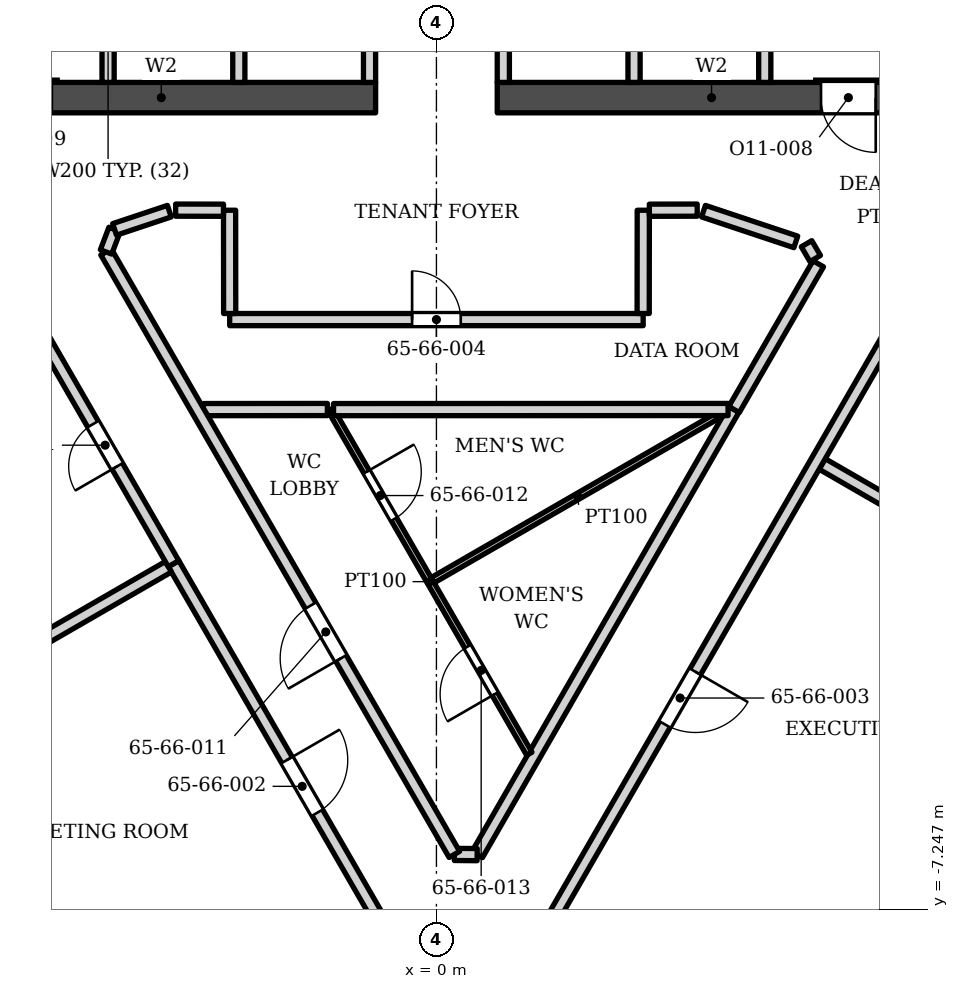
"""IFC4 building model, lengths in metres.
Left out: names, types, materials, properties, quantities, classifications, styles, units other than length and angle.
Written with IfcOpenShell. Run it as: python <this file> out.ifc"""

import sys

from ifc_helpers import new_model, si_unit, direction, frame, frame_2d, origin, place, context, subcontext, project, spatial, rectangle, extrude, element, fill, save


model = new_model("IFC4")
c1 = context("Model", 3, precision=1e-05, world=origin(), true_north=direction((0.0, 1.0)))
c2 = subcontext(c1, "Body", "Model", "MODEL_VIEW")
j1 = project(units=[si_unit("LENGTHUNIT", "METRE"), si_unit("PLANEANGLEUNIT", "RADIAN")], contexts=[c1])
p1 = place(None, origin())
s1 = spatial("IfcSite", under=j1, at=p1, CompositionType="ELEMENT")
p2 = place(p1, origin())
s2 = spatial("IfcBuilding", under=s1, at=p2, CompositionType="ELEMENT")
p3 = place(p2, frame((0.0, 0.0, 271.6)))
s3 = spatial("IfcBuildingStorey", under=s2, at=p3, CompositionType="ELEMENT", Elevation=271.6)
p4 = place(p3, frame((-8.05, 6.103, 0.0), z_axis=(0.0, 0.0, 1.0), x_axis=(1.0, 0.0, 0.0)))
e1 = element("IfcWall", 1, at=p4, inside=s3, PredefinedType="SHEAR", context=c2, shape_type="SweptSolid", body=[
    extrude(rectangle(XDim=7.05, YDim=0.5, at=frame_2d((3.525, 0.0))), origin(), (0.0, 0.0, 1.0), 3.9),
])
p5 = place(p4, frame((0.825, 0.0, 0.0)))
e2 = element("IfcOpeningElement", 2, at=p5, cuts=e1, PredefinedType="OPENING", context=c2, shape_type="SweptSolid", body=[
    extrude(rectangle(XDim=0.9, YDim=2.1, at=frame_2d((0.45, 1.05))), frame((0.0, 0.26, 0.0), z_axis=(0.0, -1.0, 0.0), x_axis=(1.0, 0.0, 0.0)), (0.0, 0.0, 1.0), 0.52),
])
p6 = place(p3, frame((1.0, 6.103, 0.0), z_axis=(0.0, 0.0, 1.0), x_axis=(1.0, 0.0, 0.0)))
e3 = element("IfcWall", 3, at=p6, inside=s3, PredefinedType="SHEAR", context=c2, shape_type="SweptSolid", body=[
    extrude(rectangle(XDim=7.05, YDim=0.5, at=frame_2d((3.525, 0.0))), origin(), (0.0, 0.0, 1.0), 3.9),
])
p7 = place(p6, frame((5.325, 0.0, 0.0)))
e4 = element("IfcOpeningElement", 4, at=p7, cuts=e3, PredefinedType="OPENING", context=c2, shape_type="SweptSolid", body=[
    extrude(rectangle(XDim=0.9, YDim=2.1, at=frame_2d((0.45, 1.05))), frame((0.0, 0.26, 0.0), z_axis=(0.0, -1.0, 0.0), x_axis=(1.0, 0.0, 0.0)), (0.0, 0.0, 1.0), 0.52),
])
for number, where, z_axis, x_axis in (
    (5, (-5.4, 6.353, 0.0), (0.0, 0.0, 1.0), (0.0, 1.0, 0.0)),
    (6, (-3.25, 6.353, 0.0), (0.0, 0.0, 1.0), (0.0, 1.0, 0.0)),
    (7, (-1.1, 6.353, 0.0), (0.0, 0.0, 1.0), (0.0, 1.0, 0.0)),
    (8, (1.1, 6.353, 0.0), (0.0, 0.0, 1.0), (0.0, 1.0, 0.0)),
    (9, (3.25, 6.353, 0.0), (0.0, 0.0, 1.0), (0.0, 1.0, 0.0)),
    (10, (5.4, 6.353, 0.0), (0.0, 0.0, 1.0), (0.0, 1.0, 0.0)),
):
    element("IfcWall", number, at=place(p3, frame(where, z_axis=z_axis, x_axis=x_axis)), inside=s3, PredefinedType="SOLIDWALL", context=c2, shape_type="SweptSolid", body=[
        extrude(rectangle(XDim=2.5, YDim=0.2, at=frame_2d((1.25, 0.0))), origin(), (0.0, 0.0, 1.0), 3.73),
    ])
p8 = place(p3, frame((-4.323, -1.562, 0.0), z_axis=(0.0, 0.0, 1.0), x_axis=(0.500177101832, -0.865923129846, 0.0)))
e11 = element("IfcWall", 11, at=p8, inside=s3, PredefinedType="PARTITIONING", context=c2, shape_type="SweptSolid", body=[
    extrude(rectangle(XDim=8.459, YDim=0.2, at=frame_2d((4.23, 0.0))), origin(), (0.0, 0.0, 1.0), 2.884),
])
p9 = place(p8, frame((3.729, 0.0, 0.0)))
e12 = element("IfcOpeningElement", 12, at=p9, cuts=e11, PredefinedType="OPENING", context=c2, shape_type="SweptSolid", body=[
    extrude(rectangle(XDim=1.0, YDim=2.1, at=frame_2d((0.5, 1.05))), frame((0.0, 0.11, 0.0), z_axis=(0.0, -1.0, 0.0), x_axis=(1.0, 0.0, 0.0)), (0.0, 0.0, 1.0), 0.22),
])
p10 = place(p3, frame((0.67, -6.346, 0.0), z_axis=(0.0, 0.0, 1.0), x_axis=(0.499143893265, 0.866519113359, 0.0)))
e13 = element("IfcWall", 13, at=p10, inside=s3, PredefinedType="PARTITIONING", context=c2, shape_type="SweptSolid", body=[
    extrude(rectangle(XDim=8.452, YDim=0.2, at=frame_2d((4.226, 0.0))), origin(), (0.0, 0.0, 1.0), 2.884),
])
p11 = place(p3, frame((0.295, -6.343, 0.0), z_axis=(0.0, 0.0, 1.0), x_axis=(0.999958464773, -0.009114204757, 0.0)))
e14 = element("IfcWall", 14, at=p11, inside=s3, PredefinedType="PARTITIONING", context=c2, shape_type="SweptSolid", body=[
    extrude(rectangle(XDim=0.375, YDim=0.2, at=frame_2d((0.188, 0.0))), origin(), (0.0, 0.0, 1.0), 3.73),
])
p12 = place(p3, frame((-9.648, -4.636, 0.0), z_axis=(0.0, 0.0, 1.0), x_axis=(0.866169461704, 0.499750401311, 0.0)))
e15 = element("IfcWall", 15, at=p12, inside=s3, PredefinedType="PARTITIONING", context=c2, shape_type="SweptSolid", body=[
    extrude(rectangle(XDim=6.05, YDim=0.2, at=frame_2d((3.025, 0.0))), origin(), (0.0, 0.0, 1.0), 2.884),
])
p13 = place(p3, frame((-6.523, 2.249, 0.0), z_axis=(0.0, 0.0, 1.0), x_axis=(0.50001224981, -0.866018331238, 0.0)))
e16 = element("IfcWall", 16, at=p13, inside=s3, PredefinedType="PARTITIONING", context=c2, shape_type="SweptSolid", body=[
    extrude(rectangle(XDim=4.4, YDim=0.2, at=frame_2d((2.2, 0.0))), origin(), (0.0, 0.0, 1.0), 2.884),
])
p14 = place(p13, frame((1.75, 0.0, 0.0)))
e17 = element("IfcOpeningElement", 17, at=p14, cuts=e16, PredefinedType="OPENING", context=c2, shape_type="SweptSolid", body=[
    extrude(rectangle(XDim=0.8, YDim=2.1, at=frame_2d((0.4, 1.05))), frame((0.0, 0.11, 0.0), z_axis=(0.0, -1.0, 0.0), x_axis=(1.0, 0.0, 0.0)), (0.0, 0.0, 1.0), 0.22),
])
p15 = place(p3, frame((6.344, 0.079, 0.0), z_axis=(0.0, 0.0, 1.0), x_axis=(0.865886439471, -0.500240616045, 0.0)))
e18 = element("IfcWall", 18, at=p15, inside=s3, PredefinedType="PARTITIONING", context=c2, shape_type="SweptSolid", body=[
    extrude(rectangle(XDim=6.049, YDim=0.2, at=frame_2d((3.025, 0.0))), origin(), (0.0, 0.0, 1.0), 3.052),
])
p16 = place(p3, frame((-0.062, -1.834, 0.0), z_axis=(0.0, 0.0, 1.0), x_axis=(0.865950314505, 0.5001300359, 0.0)))
e19 = element("IfcWall", 19, at=p16, inside=s3, PredefinedType="PARTITIONING", context=c2, shape_type="SweptSolid", body=[
    extrude(rectangle(XDim=5.513, YDim=0.1, at=frame_2d((2.757, 0.0))), origin(), (0.0, 0.0, 1.0), 2.884),
])
p17 = place(p3, frame((-3.834, 0.972, 0.0), z_axis=(0.0, 0.0, 1.0), x_axis=(0.999999742389, 0.000717789024, 0.0)))
e20 = element("IfcWall", 20, at=p17, inside=s3, PredefinedType="PARTITIONING", context=c2, shape_type="SweptSolid", body=[
    extrude(rectangle(XDim=2.041, YDim=0.2, at=frame_2d((1.021, 0.0))), origin(), (0.0, 0.0, 1.0), 3.73),
])
p18 = place(p3, frame((-1.741, 0.974, 0.0), z_axis=(0.0, 0.0, 1.0), x_axis=(0.499978916304, -0.86603757612, 0.0)))
e21 = element("IfcWall", 21, at=p18, inside=s3, PredefinedType="PARTITIONING", context=c2, shape_type="SweptSolid", body=[
    extrude(rectangle(XDim=6.537, YDim=0.1, at=frame_2d((3.269, 0.0))), origin(), (0.0, 0.0, 1.0), 2.884),
])
p19 = place(p18, frame((1.184, 0.0, 0.0)))
e22 = element("IfcOpeningElement", 22, at=p19, cuts=e21, PredefinedType="OPENING", context=c2, shape_type="SweptSolid", body=[
    extrude(rectangle(XDim=0.9, YDim=2.1, at=frame_2d((0.45, 1.05))), frame((0.0, 0.06, 0.0), z_axis=(0.0, -1.0, 0.0), x_axis=(1.0, 0.0, 0.0)), (0.0, 0.0, 1.0), 0.12),
])
p20 = place(p18, frame((4.504, 0.0, 0.0)))
e23 = element("IfcOpeningElement", 23, at=p20, cuts=e21, PredefinedType="OPENING", context=c2, shape_type="SweptSolid", body=[
    extrude(rectangle(XDim=0.9, YDim=2.1, at=frame_2d((0.45, 1.05))), frame((0.0, 0.06, 0.0), z_axis=(0.0, -1.0, 0.0), x_axis=(1.0, 0.0, 0.0)), (0.0, 0.0, 1.0), 0.12),
])
p21 = place(p3, frame((-1.692, 0.972, 0.0), z_axis=(0.0, 0.0, 1.0), x_axis=(0.999999954692, 0.000301023466, 0.0)))
e24 = element("IfcWall", 24, at=p21, inside=s3, PredefinedType="PARTITIONING", context=c2, shape_type="SweptSolid", body=[
    extrude(rectangle(XDim=6.488, YDim=0.2, at=frame_2d((3.244, 0.0))), origin(), (0.0, 0.0, 1.0), 3.73),
])
p22 = place(p3, frame((4.894, 0.974, 0.0), z_axis=(0.0, 0.0, 1.0), x_axis=(0.500549430369, 0.865707957545, 0.0)))
e25 = element("IfcWall", 25, at=p22, inside=s3, PredefinedType="PARTITIONING", context=c2, shape_type="SweptSolid", body=[
    extrude(rectangle(XDim=2.768, YDim=0.2, at=frame_2d((1.384, 0.0))), origin(), (0.0, 0.0, 1.0), 3.73),
])
p23 = place(p3, frame((-3.4, 2.452, 0.0), z_axis=(0.0, 0.0, 1.0), x_axis=(1.0, 0.0, 0.0)))
e26 = element("IfcWall", 26, at=p23, inside=s3, PredefinedType="PARTITIONING", context=c2, shape_type="SweptSolid", body=[
    extrude(rectangle(XDim=6.8, YDim=0.2, at=frame_2d((3.4, 0.0))), origin(), (0.0, 0.0, 1.0), 2.884),
])
p24 = place(p23, frame((3.0, 0.0, 0.0)))
e27 = element("IfcOpeningElement", 27, at=p24, cuts=e26, PredefinedType="OPENING", context=c2, shape_type="SweptSolid", body=[
    extrude(rectangle(XDim=0.8, YDim=2.1, at=frame_2d((0.4, 1.05))), frame((0.0, 0.11, 0.0), z_axis=(0.0, -1.0, 0.0), x_axis=(1.0, 0.0, 0.0)), (0.0, 0.0, 1.0), 0.22),
])
p25 = place(p3, frame((-3.402, 4.25, 0.0), z_axis=(0.0, 0.0, 1.0), x_axis=(0.001150250857, -0.999999338461, 0.0)))
e28 = element("IfcWall", 28, at=p25, inside=s3, PredefinedType="PARTITIONING", context=c2, shape_type="SweptSolid", body=[
    extrude(rectangle(XDim=1.698, YDim=0.2, at=frame_2d((0.849, 0.0))), origin(), (0.0, 0.0, 1.0), 3.73),
])
p26 = place(p3, frame((6.087, 3.7, 0.0), z_axis=(0.0, 0.0, 1.0), x_axis=(0.503763385613, -0.863841681858, 0.0)))
e29 = element("IfcWall", 29, at=p26, inside=s3, PredefinedType="PARTITIONING", context=c2, shape_type="SweptSolid", body=[
    extrude(rectangle(XDim=0.282, YDim=0.2, at=frame_2d((0.141, 0.0))), origin(), (0.0, 0.0, 1.0), 3.73),
])
p27 = place(p3, frame((1.757, -7.668, 0.0), z_axis=(0.0, 0.0, 1.0), x_axis=(0.500002084865, 0.866024200084, 0.0)))
e30 = element("IfcWall", 30, at=p27, inside=s3, PredefinedType="PARTITIONING", context=c2, shape_type="SweptSolid", body=[
    extrude(rectangle(XDim=12.949, YDim=0.2, at=frame_2d((6.474, 0.0))), origin(), (0.0, 0.0, 1.0), 2.884),
])
p28 = place(p27, frame((4.0, 0.0, 0.0)))
e31 = element("IfcOpeningElement", 31, at=p28, cuts=e30, PredefinedType="OPENING", context=c2, shape_type="SweptSolid", body=[
    extrude(rectangle(XDim=1.0, YDim=2.4, at=frame_2d((0.5, 1.2))), frame((0.0, 0.11, 0.0), z_axis=(0.0, -1.0, 0.0), x_axis=(1.0, 0.0, 0.0)), (0.0, 0.0, 1.0), 0.22),
])
p29 = place(p3, frame((-5.433, 3.565, 0.0), z_axis=(0.0, 0.0, 1.0), x_axis=(0.500524932541, -0.865722121644, 0.0)))
e32 = element("IfcWall", 32, at=p29, inside=s3, PredefinedType="PARTITIONING", context=c2, shape_type="SweptSolid", body=[
    extrude(rectangle(XDim=11.445, YDim=0.2, at=frame_2d((5.723, 0.0))), origin(), (0.0, 0.0, 1.0), 2.884),
])
p30 = place(p29, frame((6.719, 0.0, 0.0)))
e33 = element("IfcOpeningElement", 33, at=p30, cuts=e32, PredefinedType="OPENING", context=c2, shape_type="SweptSolid", body=[
    extrude(rectangle(XDim=1.0, YDim=2.1, at=frame_2d((0.5, 1.05))), frame((0.0, 0.11, 0.0), z_axis=(0.0, -1.0, 0.0), x_axis=(1.0, 0.0, 0.0)), (0.0, 0.0, 1.0), 0.22),
])
p31 = place(p3, frame((4.393, 4.236, 0.0), z_axis=(0.0, 0.0, 1.0), x_axis=(0.948729076189, -0.316090398453, 0.0)))
e34 = element("IfcWall", 34, at=p31, inside=s3, PredefinedType="PARTITIONING", context=c2, shape_type="SweptSolid", body=[
    extrude(rectangle(XDim=1.6, YDim=0.2, at=frame_2d((0.8, 0.0))), origin(), (0.0, 0.0, 1.0), 2.884),
])
p32 = place(p3, frame((-5.433, 3.565, 0.0), z_axis=(0.0, 0.0, 1.0), x_axis=(0.354431242796, 0.93508207882, 0.0)))
e35 = element("IfcWall", 35, at=p32, inside=s3, PredefinedType="PARTITIONING", context=c2, shape_type="SweptSolid", body=[
    extrude(rectangle(XDim=0.396, YDim=0.2, at=frame_2d((0.198, 0.0))), origin(), (0.0, 0.0, 1.0), 3.73),
])
p33 = place(p3, frame((-5.293, 3.936, 0.0), z_axis=(0.0, 0.0, 1.0), x_axis=(0.948709019126, 0.316150592328, 0.0)))
e36 = element("IfcWall", 36, at=p33, inside=s3, PredefinedType="PARTITIONING", context=c2, shape_type="SweptSolid", body=[
    extrude(rectangle(XDim=0.949, YDim=0.2, at=frame_2d((0.475, 0.0))), origin(), (0.0, 0.0, 1.0), 2.884),
])
p34 = place(p3, frame((-4.289, 4.252, 0.0), z_axis=(0.0, 0.0, 1.0), x_axis=(0.999997642919, -0.002171210763, 0.0)))
e37 = element("IfcWall", 37, at=p34, inside=s3, PredefinedType="PARTITIONING", context=c2, shape_type="SweptSolid", body=[
    extrude(rectangle(XDim=0.787, YDim=0.2, at=frame_2d((0.394, 0.0))), origin(), (0.0, 0.0, 1.0), 3.73),
])
p35 = place(p3, frame((3.4, 2.552, 0.0), z_axis=(0.0, 0.0, 1.0), x_axis=(0.001150250857, 0.999999338461, 0.0)))
e38 = element("IfcWall", 38, at=p35, inside=s3, PredefinedType="PARTITIONING", context=c2, shape_type="SweptSolid", body=[
    extrude(rectangle(XDim=1.698, YDim=0.2, at=frame_2d((0.849, 0.0))), origin(), (0.0, 0.0, 1.0), 3.73),
])
p36 = place(p3, frame((3.502, 4.251, 0.0), z_axis=(0.0, 0.0, 1.0), x_axis=(0.999997642919, 0.002171210763, 0.0)))
e39 = element("IfcWall", 39, at=p36, inside=s3, PredefinedType="PARTITIONING", context=c2, shape_type="SweptSolid", body=[
    extrude(rectangle(XDim=0.787, YDim=0.2, at=frame_2d((0.394, 0.0))), origin(), (0.0, 0.0, 1.0), 3.73),
])
p37 = place(p7, origin())
e40 = element("IfcDoor", 40, at=p37, inside=s3, OperationType="SINGLE_SWING_RIGHT", PredefinedType="DOOR", context=c2, shape_type="SweptSolid", body=[
    extrude(rectangle(XDim=0.9, YDim=2.1, at=frame_2d((0.45, 1.05))), frame((0.0, 0.025, 0.0), z_axis=(0.0, -1.0, 0.0), x_axis=(1.0, 0.0, 0.0)), (0.0, 0.0, 1.0), 0.05),
])
fill(e4, e40)
p38 = place(p14, origin())
e41 = element("IfcDoor", 41, at=p38, inside=s3, OperationType="SINGLE_SWING_RIGHT", PredefinedType="DOOR", context=c2, shape_type="SweptSolid", body=[
    extrude(rectangle(XDim=0.8, YDim=2.1, at=frame_2d((0.4, 1.05))), frame((0.0, 0.025, 0.0), z_axis=(0.0, -1.0, 0.0), x_axis=(1.0, 0.0, 0.0)), (0.0, 0.0, 1.0), 0.05),
])
fill(e17, e41)
p39 = place(p9, origin())
e42 = element("IfcDoor", 42, at=p39, inside=s3, OperationType="SINGLE_SWING_LEFT", PredefinedType="DOOR", context=c2, shape_type="SweptSolid", body=[
    extrude(rectangle(XDim=1.0, YDim=2.1, at=frame_2d((0.5, 1.05))), frame((0.0, 0.025, 0.0), z_axis=(0.0, -1.0, 0.0), x_axis=(1.0, 0.0, 0.0)), (0.0, 0.0, 1.0), 0.05),
])
fill(e12, e42)
p40 = place(p28, origin())
e43 = element("IfcDoor", 43, at=p40, inside=s3, OperationType="SINGLE_SWING_RIGHT", PredefinedType="DOOR", context=c2, shape_type="SweptSolid", body=[
    extrude(rectangle(XDim=1.0, YDim=2.4, at=frame_2d((0.5, 1.2))), frame((0.0, 0.025, 0.0), z_axis=(0.0, -1.0, 0.0), x_axis=(1.0, 0.0, 0.0)), (0.0, 0.0, 1.0), 0.05),
])
fill(e31, e43)
p41 = place(p24, origin())
e44 = element("IfcDoor", 44, at=p41, inside=s3, OperationType="SINGLE_SWING_LEFT", PredefinedType="DOOR", context=c2, shape_type="SweptSolid", body=[
    extrude(rectangle(XDim=0.8, YDim=2.1, at=frame_2d((0.4, 1.05))), frame((0.0, 0.025, 0.0), z_axis=(0.0, -1.0, 0.0), x_axis=(1.0, 0.0, 0.0)), (0.0, 0.0, 1.0), 0.05),
])
fill(e27, e44)
p42 = place(p30, origin())
e45 = element("IfcDoor", 45, at=p42, inside=s3, OperationType="SINGLE_SWING_RIGHT", PredefinedType="DOOR", context=c2, shape_type="SweptSolid", body=[
    extrude(rectangle(XDim=1.0, YDim=2.1, at=frame_2d((0.5, 1.05))), frame((0.0, 0.025, 0.0), z_axis=(0.0, -1.0, 0.0), x_axis=(1.0, 0.0, 0.0)), (0.0, 0.0, 1.0), 0.05),
])
fill(e33, e45)
p43 = place(p19, origin())
e46 = element("IfcDoor", 46, at=p43, inside=s3, OperationType="SINGLE_SWING_LEFT", PredefinedType="DOOR", context=c2, shape_type="SweptSolid", body=[
    extrude(rectangle(XDim=0.9, YDim=2.1, at=frame_2d((0.45, 1.05))), frame((0.0, 0.025, 0.0), z_axis=(0.0, -1.0, 0.0), x_axis=(1.0, 0.0, 0.0)), (0.0, 0.0, 1.0), 0.05),
])
fill(e22, e46)
p44 = place(p20, origin())
e47 = element("IfcDoor", 47, at=p44, inside=s3, OperationType="SINGLE_SWING_RIGHT", PredefinedType="DOOR", context=c2, shape_type="SweptSolid", body=[
    extrude(rectangle(XDim=0.9, YDim=2.1, at=frame_2d((0.45, 1.05))), frame((0.0, 0.025, 0.0), z_axis=(0.0, -1.0, 0.0), x_axis=(1.0, 0.0, 0.0)), (0.0, 0.0, 1.0), 0.05),
])
fill(e23, e47)
save(model, sys.argv[1])
